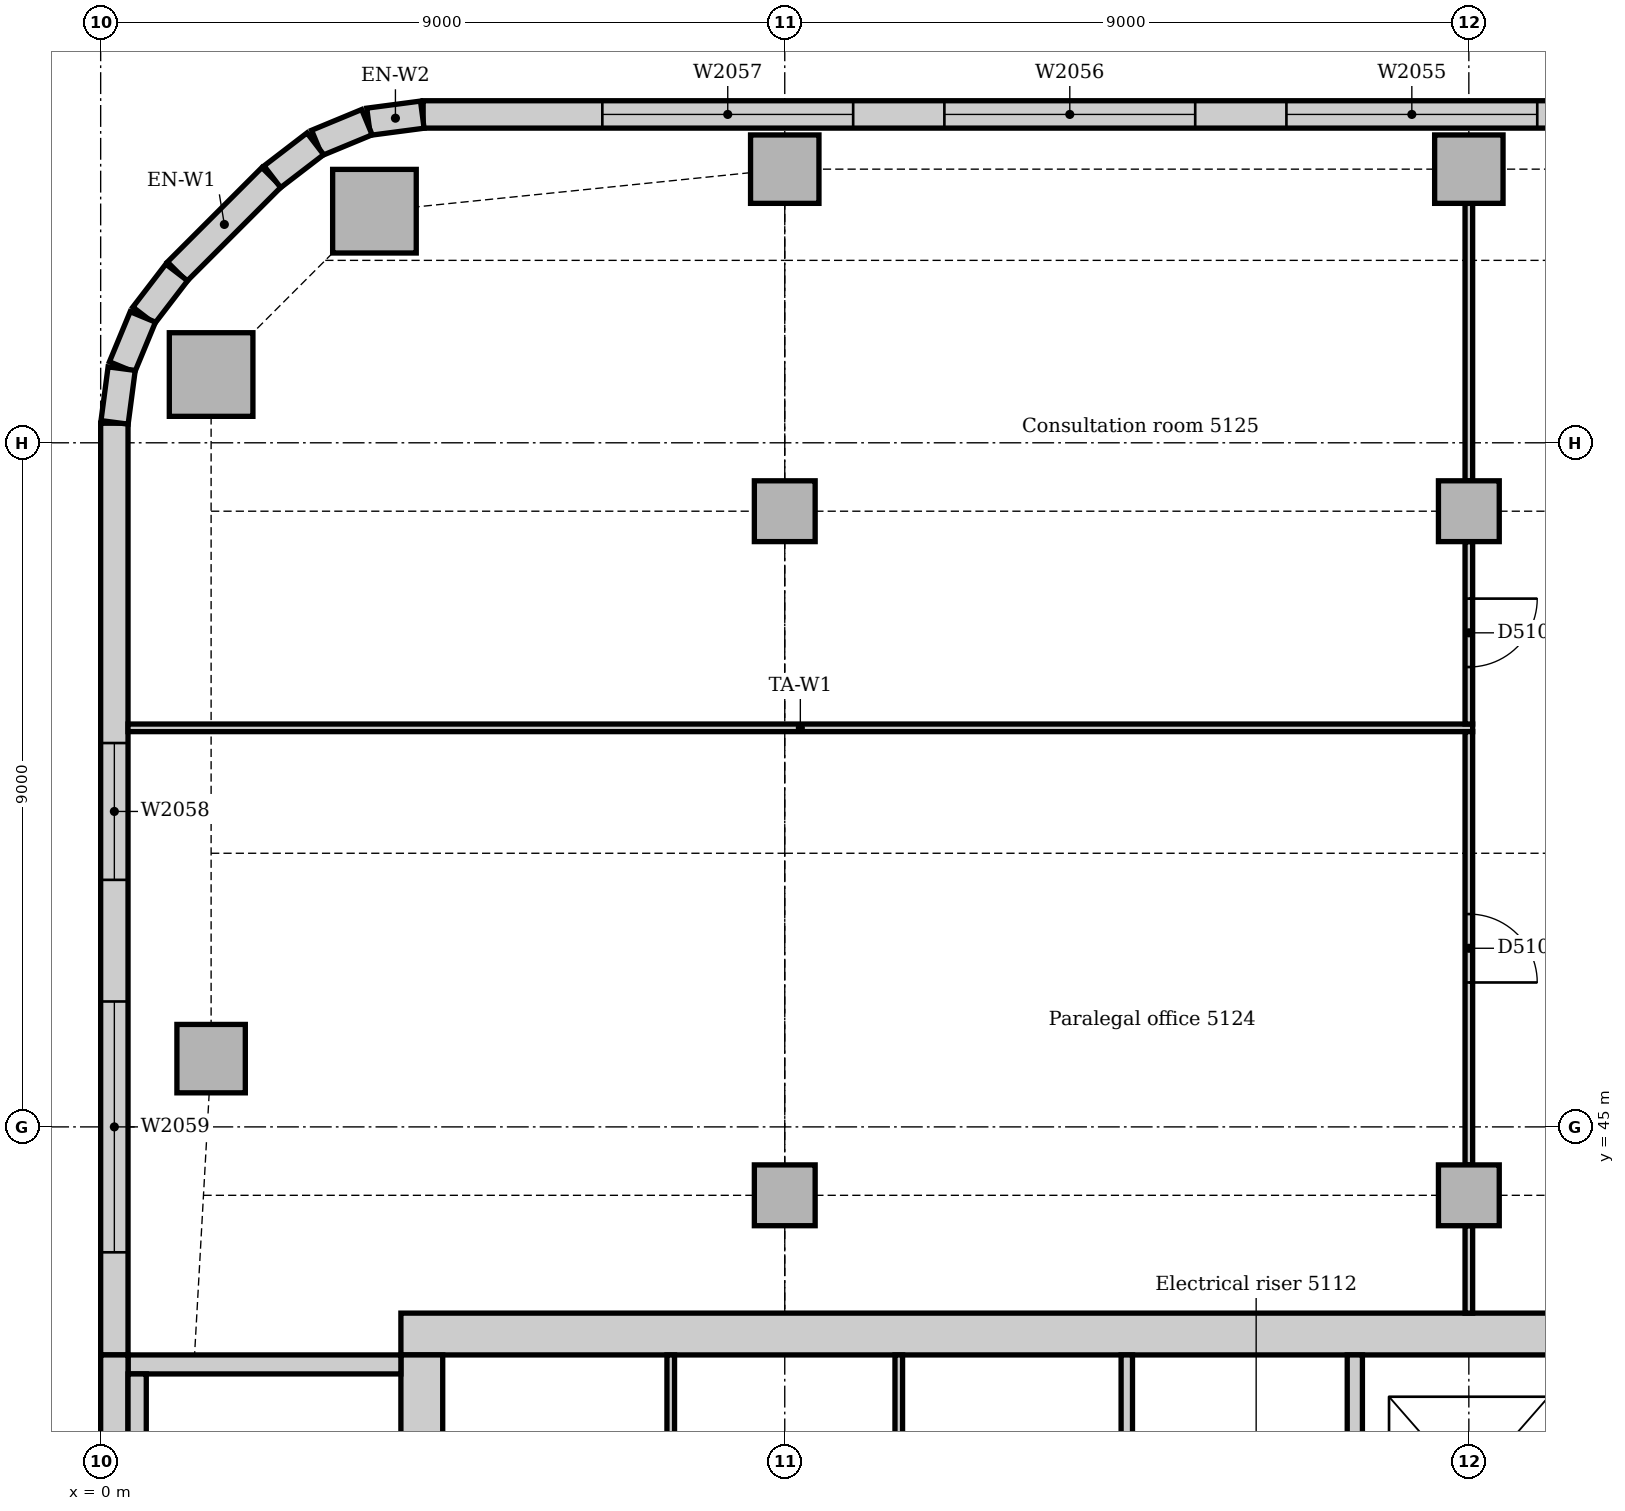
"""IFC4 building model, lengths in metres.
Left out: names, types, materials, properties, quantities, classifications, styles, units other than length and angle.
Written with IfcOpenShell. Run it as: python <this file> out.ifc"""

import sys

from ifc_helpers import new_model, si_unit, direction, frame, frame_2d, origin, origin_2d, place, context, subcontext, project, spatial, rectangle, extrude, element, fill, save


model = new_model("IFC4")
c1 = context("Model", 3, precision=1e-05, world=origin(), true_north=direction((0.0, 1.0)))
c2 = subcontext(c1, "Body", "Model", "MODEL_VIEW")
j1 = project(units=[si_unit("LENGTHUNIT", "METRE"), si_unit("PLANEANGLEUNIT", "RADIAN")], contexts=[c1])
p1 = place(None, origin())
s1 = spatial("IfcSite", under=j1, at=p1, CompositionType="ELEMENT")
p2 = place(p1, origin())
s2 = spatial("IfcBuilding", under=s1, at=p2, CompositionType="ELEMENT")
p3 = place(p2, frame((0.0, 0.0, 214.0)))
s3 = spatial("IfcBuildingStorey", under=s2, at=p3, CompositionType="ELEMENT", Elevation=214.0)
p4 = place(p3, frame((23.05, 42.275, 0.0), z_axis=(0.0, 0.0, 1.0), x_axis=(-1.0, 0.0, 0.0)))
e1 = element("IfcWall", 1, at=p4, inside=s3, PredefinedType="SOLIDWALL", context=c2, shape_type="SweptSolid", body=[
    extrude(rectangle(XDim=19.1, YDim=0.55, at=frame_2d((9.55, 0.0))), origin(), (0.0, 0.0, 1.0), 4.0),
])
p5 = place(p3, frame((4.225, 42.0, 0.0), z_axis=(0.0, 0.0, 1.0), x_axis=(0.0, -1.0, 0.0)))
e2 = element("IfcWall", 2, at=p5, inside=s3, PredefinedType="SOLIDWALL", context=c2, shape_type="SweptSolid", body=[
    extrude(rectangle(XDim=10.5, YDim=0.55, at=frame_2d((5.25, 0.0))), origin(), (0.0, 0.0, 1.0), 4.0),
])
p6 = place(p5, frame((5.3, 0.0, 0.0)))
e3 = element("IfcOpeningElement", 3, at=p6, cuts=e2, PredefinedType="OPENING", context=c2, shape_type="SweptSolid", body=[
    extrude(rectangle(XDim=1.0, YDim=2.1, at=frame_2d((0.5, 1.05))), frame((0.0, 0.285, 0.0), z_axis=(0.0, -1.0, 0.0), x_axis=(1.0, 0.0, 0.0)), (0.0, 0.0, 1.0), 0.57),
])
p7 = place(p3, frame((3.95, 41.875, 0.0), z_axis=(0.0, 0.0, 1.0), x_axis=(-1.0, 0.0, 0.0)))
e4 = element("IfcWall", 4, at=p7, inside=s3, PredefinedType="SOLIDWALL", context=c2, shape_type="SweptSolid", body=[
    extrude(rectangle(XDim=3.59, YDim=0.25, at=frame_2d((1.795, 0.0))), origin(), (0.0, 0.0, 1.0), 4.0),
])
for number, where, z_axis, x_axis in (
    (5, (3.602, 57.047, 0.0), (0.0, 0.0, 1.0), (1.0, 0.0, 0.0)),
    (6, (1.453, 54.898, 0.0), (0.0, 0.0, 1.0), (1.0, 0.0, 0.0)),
):
    element("IfcColumn", number, at=place(p3, frame(where, z_axis=z_axis, x_axis=x_axis)), inside=s3, PredefinedType="COLUMN", context=c2, shape_type="SweptSolid", body=[
        extrude(rectangle(XDim=1.1, YDim=1.1, at=origin_2d()), origin(), (0.0, 0.0, 1.0), 3.85),
    ])
for number, where, z_axis, x_axis in (
    (7, (9.0, 57.6, 0.0), (0.0, 0.0, 1.0), (1.0, 0.0, 0.0)),
    (8, (18.0, 57.6, 0.0), (0.0, 0.0, 1.0), (1.0, 0.0, 0.0)),
    (9, (1.453, 45.898, 0.0), (0.0, 0.0, 1.0), (1.0, 0.0, 0.0)),
):
    element("IfcColumn", number, at=place(p3, frame(where, z_axis=z_axis, x_axis=x_axis)), inside=s3, PredefinedType="COLUMN", context=c2, shape_type="SweptSolid", body=[
        extrude(rectangle(XDim=0.9, YDim=0.9, at=origin_2d()), origin(), (0.0, 0.0, 1.0), 3.85),
    ])
for number, where, z_axis, x_axis in (
    (10, (9.0, 44.1, 0.0), (0.0, 0.0, 1.0), (1.0, 0.0, 0.0)),
    (11, (9.0, 53.1, 0.0), (0.0, 0.0, 1.0), (1.0, 0.0, 0.0)),
    (12, (18.0, 44.1, 0.0), (0.0, 0.0, 1.0), (1.0, 0.0, 0.0)),
    (13, (18.0, 53.1, 0.0), (0.0, 0.0, 1.0), (1.0, 0.0, 0.0)),
):
    element("IfcColumn", number, at=place(p3, frame(where, z_axis=z_axis, x_axis=x_axis)), inside=s3, PredefinedType="COLUMN", context=c2, shape_type="SweptSolid", body=[
        extrude(rectangle(XDim=0.8, YDim=0.8, at=origin_2d()), origin(), (0.0, 0.0, 1.0), 3.85),
    ])
p8 = place(p3, frame((34.757, 58.32, 0.0), z_axis=(0.0, 0.0, 1.0), x_axis=(-1.0, 0.0, 0.0)))
e14 = element("IfcWall", 14, at=p8, inside=s3, PredefinedType="STANDARD", context=c2, shape_type="SweptSolid", body=[
    extrude(rectangle(XDim=30.515, YDim=0.36, at=frame_2d((15.257, 0.0))), origin(), (0.0, 0.0, 1.0), 3.85),
])
p9 = place(p8, frame((2.357, 0.0, 0.9)))
e15 = element("IfcOpeningElement", 15, at=p9, cuts=e14, PredefinedType="OPENING", context=c2, shape_type="SweptSolid", body=[
    extrude(rectangle(XDim=3.3, YDim=1.6, at=frame_2d((1.65, 0.8))), frame((0.0, 0.19, 0.0), z_axis=(0.0, -1.0, 0.0), x_axis=(1.0, 0.0, 0.0)), (0.0, 0.0, 1.0), 0.38),
])
p10 = place(p8, frame((6.857, 0.0, 0.9)))
e16 = element("IfcOpeningElement", 16, at=p10, cuts=e14, PredefinedType="OPENING", context=c2, shape_type="SweptSolid", body=[
    extrude(rectangle(XDim=3.3, YDim=1.6, at=frame_2d((1.65, 0.8))), frame((0.0, 0.19, 0.0), z_axis=(0.0, -1.0, 0.0), x_axis=(1.0, 0.0, 0.0)), (0.0, 0.0, 1.0), 0.38),
])
p11 = place(p8, frame((11.357, 0.0, 0.9)))
e17 = element("IfcOpeningElement", 17, at=p11, cuts=e14, PredefinedType="OPENING", context=c2, shape_type="SweptSolid", body=[
    extrude(rectangle(XDim=3.3, YDim=1.6, at=frame_2d((1.65, 0.8))), frame((0.0, 0.19, 0.0), z_axis=(0.0, -1.0, 0.0), x_axis=(1.0, 0.0, 0.0)), (0.0, 0.0, 1.0), 0.38),
])
p12 = place(p8, frame((15.857, 0.0, 0.9)))
e18 = element("IfcOpeningElement", 18, at=p12, cuts=e14, PredefinedType="OPENING", context=c2, shape_type="SweptSolid", body=[
    extrude(rectangle(XDim=3.3, YDim=1.6, at=frame_2d((1.65, 0.8))), frame((0.0, 0.19, 0.0), z_axis=(0.0, -1.0, 0.0), x_axis=(1.0, 0.0, 0.0)), (0.0, 0.0, 1.0), 0.38),
])
p13 = place(p8, frame((20.357, 0.0, 0.9)))
e19 = element("IfcOpeningElement", 19, at=p13, cuts=e14, PredefinedType="OPENING", context=c2, shape_type="SweptSolid", body=[
    extrude(rectangle(XDim=3.3, YDim=1.6, at=frame_2d((1.65, 0.8))), frame((0.0, 0.19, 0.0), z_axis=(0.0, -1.0, 0.0), x_axis=(1.0, 0.0, 0.0)), (0.0, 0.0, 1.0), 0.38),
])
p14 = place(p8, frame((24.857, 0.0, 0.9)))
e20 = element("IfcOpeningElement", 20, at=p14, cuts=e14, PredefinedType="OPENING", context=c2, shape_type="SweptSolid", body=[
    extrude(rectangle(XDim=3.3, YDim=1.6, at=frame_2d((1.65, 0.8))), frame((0.0, 0.19, 0.0), z_axis=(0.0, -1.0, 0.0), x_axis=(1.0, 0.0, 0.0)), (0.0, 0.0, 1.0), 0.38),
])
p15 = place(p3, frame((2.249, 57.494, 0.0), z_axis=(0.0, 0.0, 1.0), x_axis=(-0.707106781187, -0.707106781187, 0.0)))
e21 = element("IfcWall", 21, at=p15, inside=s3, PredefinedType="STANDARD", context=c2, shape_type="SweptSolid", body=[
    extrude(rectangle(XDim=1.757, YDim=0.36, at=frame_2d((0.879, 0.0))), origin(), (0.0, 0.0, 1.0), 3.85),
])
p16 = place(p3, frame((0.18, 54.257, 0.0), z_axis=(0.0, 0.0, 1.0), x_axis=(0.0, -1.0, 0.0)))
e22 = element("IfcWall", 22, at=p16, inside=s3, PredefinedType="STANDARD", context=c2, shape_type="SweptSolid", body=[
    extrude(rectangle(XDim=12.257, YDim=0.36, at=frame_2d((6.129, 0.0))), origin(), (0.0, 0.0, 1.0), 3.85),
])
p17 = place(p16, frame((4.207, 0.0, 0.9)))
e23 = element("IfcOpeningElement", 23, at=p17, cuts=e22, PredefinedType="OPENING", context=c2, shape_type="SweptSolid", body=[
    extrude(rectangle(XDim=1.8, YDim=1.6, at=frame_2d((0.9, 0.8))), frame((0.0, 0.19, 0.0), z_axis=(0.0, -1.0, 0.0), x_axis=(1.0, 0.0, 0.0)), (0.0, 0.0, 1.0), 0.38),
])
p18 = place(p16, frame((7.607, 0.0, 0.9)))
e24 = element("IfcOpeningElement", 24, at=p18, cuts=e22, PredefinedType="OPENING", context=c2, shape_type="SweptSolid", body=[
    extrude(rectangle(XDim=3.3, YDim=1.6, at=frame_2d((1.65, 0.8))), frame((0.0, 0.19, 0.0), z_axis=(0.0, -1.0, 0.0), x_axis=(1.0, 0.0, 0.0)), (0.0, 0.0, 1.0), 0.38),
])
p19 = place(p3, frame((0.18, 42.0, 0.0), z_axis=(0.0, 0.0, 1.0), x_axis=(0.0, -1.0, 0.0)))
e25 = element("IfcWall", 25, at=p19, inside=s3, PredefinedType="STANDARD", context=c2, shape_type="SweptSolid", body=[
    extrude(rectangle(XDim=6.75, YDim=0.36, at=frame_2d((3.375, 0.0))), origin(), (0.0, 0.0, 1.0), 3.85),
])
for number, where, z_axis, x_axis in (
    (26, (4.231, 58.317, 0.0), (0.0, 0.0, 1.0), (-0.991, -0.131, 0.0)),
    (27, (3.503, 58.218, 0.0), (0.0, 0.0, 1.0), (-0.924, -0.383, 0.0)),
):
    element("IfcWall", number, at=place(p3, frame(where, z_axis=z_axis, x_axis=x_axis)), inside=s3, PredefinedType="STANDARD", context=c2, shape_type="SweptSolid", body=[
        extrude(rectangle(XDim=0.713, YDim=0.36, at=frame_2d((0.356, 0.0))), origin(), (0.0, 0.0, 1.0), 3.85),
    ])
for number, where, z_axis, x_axis in (
    (28, (2.825, 57.934, 0.0), (0.0, 0.0, 1.0), (-0.793, -0.609, 0.0)),
    (29, (1.0, 56.241, 0.0), (0.0, 0.0, 1.0), (-0.609, -0.793, 0.0)),
):
    element("IfcWall", number, at=place(p3, frame(where, z_axis=z_axis, x_axis=x_axis)), inside=s3, PredefinedType="STANDARD", context=c2, shape_type="SweptSolid", body=[
        extrude(rectangle(XDim=0.713, YDim=0.36, at=frame_2d((0.357, 0.0))), origin(), (0.0, 0.0, 1.0), 3.85),
    ])
for number, where, z_axis, x_axis in (
    (30, (0.555, 55.656, 0.0), (0.0, 0.0, 1.0), (-0.383, -0.924, 0.0)),
    (31, (0.276, 54.976, 0.0), (0.0, 0.0, 1.0), (-0.131, -0.991, 0.0)),
):
    element("IfcWall", number, at=place(p3, frame(where, z_axis=z_axis, x_axis=x_axis)), inside=s3, PredefinedType="STANDARD", context=c2, shape_type="SweptSolid", body=[
        extrude(rectangle(XDim=0.713, YDim=0.36, at=frame_2d((0.356, 0.0))), origin(), (0.0, 0.0, 1.0), 3.85),
    ])
p20 = place(p3, frame((0.48, 40.13, 0.0), z_axis=(0.0, 0.0, 1.0), x_axis=(0.0, 1.0, 0.0)))
e32 = element("IfcWall", 32, at=p20, inside=s3, PredefinedType="STANDARD", context=c2, shape_type="SweptSolid", body=[
    extrude(rectangle(XDim=1.62, YDim=0.24, at=frame_2d((0.81, 0.0))), origin(), (0.0, 0.0, 1.0), 4.0),
])
p21 = place(p3, frame((16.5, 38.6, 0.0), z_axis=(0.0, 0.0, 1.0), x_axis=(0.0, 1.0, 0.0)))
e33 = element("IfcWall", 33, at=p21, inside=s3, PredefinedType="PARTITIONING", context=c2, shape_type="SweptSolid", body=[
    extrude(rectangle(XDim=3.4, YDim=0.2, at=frame_2d((1.7, 0.0))), origin(), (0.0, 0.0, 1.0), 3.85),
])
p22 = place(p3, frame((13.5, 38.575, 0.0), z_axis=(0.0, 0.0, 1.0), x_axis=(0.0, 1.0, 0.0)))
e34 = element("IfcWall", 34, at=p22, inside=s3, PredefinedType="PARTITIONING", context=c2, shape_type="SweptSolid", body=[
    extrude(rectangle(XDim=3.425, YDim=0.15, at=frame_2d((1.712, 0.0))), origin(), (0.0, 0.0, 1.0), 3.85),
])
p23 = place(p3, frame((0.36, 50.25, 0.0), z_axis=(0.0, 0.0, 1.0), x_axis=(1.0, 0.0, 0.0)))
e35 = element("IfcWall", 35, at=p23, inside=s3, PredefinedType="PARTITIONING", context=c2, shape_type="SweptSolid", body=[
    extrude(rectangle(XDim=17.69, YDim=0.1, at=frame_2d((8.845, 0.0))), origin(), (0.0, 0.0, 1.0), 3.85),
])
p24 = place(p3, frame((18.0, 42.55, 0.0), z_axis=(0.0, 0.0, 1.0), x_axis=(0.0, 1.0, 0.0)))
e36 = element("IfcWall", 36, at=p24, inside=s3, PredefinedType="PARTITIONING", context=c2, shape_type="SweptSolid", body=[
    extrude(rectangle(XDim=1.15, YDim=0.1, at=frame_2d((0.575, 0.0))), origin(), (0.0, 0.0, 1.0), 3.652),
])
p25 = place(p3, frame((18.0, 50.3, 0.0), z_axis=(0.0, 0.0, 1.0), x_axis=(0.0, 1.0, 0.0)))
e37 = element("IfcWall", 37, at=p25, inside=s3, PredefinedType="PARTITIONING", context=c2, shape_type="SweptSolid", body=[
    extrude(rectangle(XDim=2.4, YDim=0.1, at=frame_2d((1.2, 0.0))), origin(), (0.0, 0.0, 1.0), 3.35),
])
p26 = place(p25, frame((0.75, 0.0, 0.0)))
e38 = element("IfcOpeningElement", 38, at=p26, cuts=e37, PredefinedType="OPENING", context=c2, shape_type="SweptSolid", body=[
    extrude(rectangle(XDim=0.9, YDim=2.1, at=frame_2d((0.45, 1.05))), frame((0.0, 0.06, 0.0), z_axis=(0.0, -1.0, 0.0), x_axis=(1.0, 0.0, 0.0)), (0.0, 0.0, 1.0), 0.12),
])
p27 = place(p3, frame((18.0, 44.5, 0.0), z_axis=(0.0, 0.0, 1.0), x_axis=(0.0, 1.0, 0.0)))
e39 = element("IfcWall", 39, at=p27, inside=s3, PredefinedType="PARTITIONING", context=c2, shape_type="SweptSolid", body=[
    extrude(rectangle(XDim=5.7, YDim=0.1, at=frame_2d((2.85, 0.0))), origin(), (0.0, 0.0, 1.0), 3.35),
])
p28 = place(p27, frame((2.4, 0.0, 0.0)))
e40 = element("IfcOpeningElement", 40, at=p28, cuts=e39, PredefinedType="OPENING", context=c2, shape_type="SweptSolid", body=[
    extrude(rectangle(XDim=0.9, YDim=2.1, at=frame_2d((0.45, 1.05))), frame((0.0, 0.06, 0.0), z_axis=(0.0, -1.0, 0.0), x_axis=(1.0, 0.0, 0.0)), (0.0, 0.0, 1.0), 0.12),
])
p29 = place(p3, frame((18.0, 53.5, 0.0), z_axis=(0.0, 0.0, 1.0), x_axis=(0.0, 1.0, 0.0)))
e41 = element("IfcWall", 41, at=p29, inside=s3, PredefinedType="PARTITIONING", context=c2, shape_type="SweptSolid", body=[
    extrude(rectangle(XDim=3.65, YDim=0.1, at=frame_2d((1.825, 0.0))), origin(), (0.0, 0.0, 1.0), 3.41),
])
for number, where, z_axis, x_axis in (
    (42, (7.5, 38.575, 0.0), (0.0, 0.0, 1.0), (0.0, 1.0, 0.0)),
    (43, (10.5, 38.575, 0.0), (0.0, 0.0, 1.0), (0.0, 1.0, 0.0)),
):
    element("IfcWall", number, at=place(p3, frame(where, z_axis=z_axis, x_axis=x_axis)), inside=s3, PredefinedType="PARTITIONING", context=c2, shape_type="SweptSolid", body=[
        extrude(rectangle(XDim=3.425, YDim=0.1, at=frame_2d((1.712, 0.0))), origin(), (0.0, 0.0, 1.0), 3.85),
    ])
p30 = place(p12, origin())
e44 = element("IfcWindow", 44, at=p30, inside=s3, PartitioningType="SINGLE_PANEL", PredefinedType="WINDOW", context=c2, shape_type="SweptSolid", body=[
    extrude(rectangle(XDim=3.3, YDim=1.6, at=frame_2d((1.65, 0.8))), frame((0.0, 0.13, 0.0), z_axis=(0.0, -1.0, 0.0), x_axis=(1.0, 0.0, 0.0)), (0.0, 0.0, 1.0), 0.06),
])
fill(e18, e44)
p31 = place(p13, origin())
e45 = element("IfcWindow", 45, at=p31, inside=s3, PartitioningType="SINGLE_PANEL", PredefinedType="WINDOW", context=c2, shape_type="SweptSolid", body=[
    extrude(rectangle(XDim=3.3, YDim=1.6, at=frame_2d((1.65, 0.8))), frame((0.0, 0.13, 0.0), z_axis=(0.0, -1.0, 0.0), x_axis=(1.0, 0.0, 0.0)), (0.0, 0.0, 1.0), 0.06),
])
fill(e19, e45)
p32 = place(p14, origin())
e46 = element("IfcWindow", 46, at=p32, inside=s3, PartitioningType="SINGLE_PANEL", PredefinedType="WINDOW", context=c2, shape_type="SweptSolid", body=[
    extrude(rectangle(XDim=3.3, YDim=1.6, at=frame_2d((1.65, 0.8))), frame((0.0, 0.13, 0.0), z_axis=(0.0, -1.0, 0.0), x_axis=(1.0, 0.0, 0.0)), (0.0, 0.0, 1.0), 0.06),
])
fill(e20, e46)
p33 = place(p17, origin())
e47 = element("IfcWindow", 47, at=p33, inside=s3, PartitioningType="SINGLE_PANEL", PredefinedType="WINDOW", context=c2, shape_type="SweptSolid", body=[
    extrude(rectangle(XDim=1.8, YDim=1.6, at=frame_2d((0.9, 0.8))), frame((0.0, 0.13, 0.0), z_axis=(0.0, -1.0, 0.0), x_axis=(1.0, 0.0, 0.0)), (0.0, 0.0, 1.0), 0.06),
])
fill(e23, e47)
p34 = place(p18, origin())
e48 = element("IfcWindow", 48, at=p34, inside=s3, PartitioningType="SINGLE_PANEL", PredefinedType="WINDOW", context=c2, shape_type="SweptSolid", body=[
    extrude(rectangle(XDim=3.3, YDim=1.6, at=frame_2d((1.65, 0.8))), frame((0.0, 0.13, 0.0), z_axis=(0.0, -1.0, 0.0), x_axis=(1.0, 0.0, 0.0)), (0.0, 0.0, 1.0), 0.06),
])
fill(e24, e48)
p35 = place(p28, frame((0.9, 0.0, 0.0), z_axis=(0.0, 0.0, 1.0), x_axis=(-1.0, 0.0, 0.0)))
e49 = element("IfcDoor", 49, at=p35, inside=s3, OperationType="SINGLE_SWING_RIGHT", PredefinedType="DOOR", context=c2, shape_type="SweptSolid", body=[
    extrude(rectangle(XDim=0.9, YDim=2.1, at=frame_2d((0.45, 1.05))), frame((0.0, 0.025, 0.0), z_axis=(0.0, -1.0, 0.0), x_axis=(1.0, 0.0, 0.0)), (0.0, 0.0, 1.0), 0.05),
])
fill(e40, e49)
p36 = place(p26, frame((0.9, 0.0, 0.0), z_axis=(0.0, 0.0, 1.0), x_axis=(-1.0, 0.0, 0.0)))
e50 = element("IfcDoor", 50, at=p36, inside=s3, OperationType="SINGLE_SWING_LEFT", PredefinedType="DOOR", context=c2, shape_type="SweptSolid", body=[
    extrude(rectangle(XDim=0.9, YDim=2.1, at=frame_2d((0.45, 1.05))), frame((0.0, 0.025, 0.0), z_axis=(0.0, -1.0, 0.0), x_axis=(1.0, 0.0, 0.0)), (0.0, 0.0, 1.0), 0.05),
])
fill(e38, e50)
save(model, sys.argv[1])
